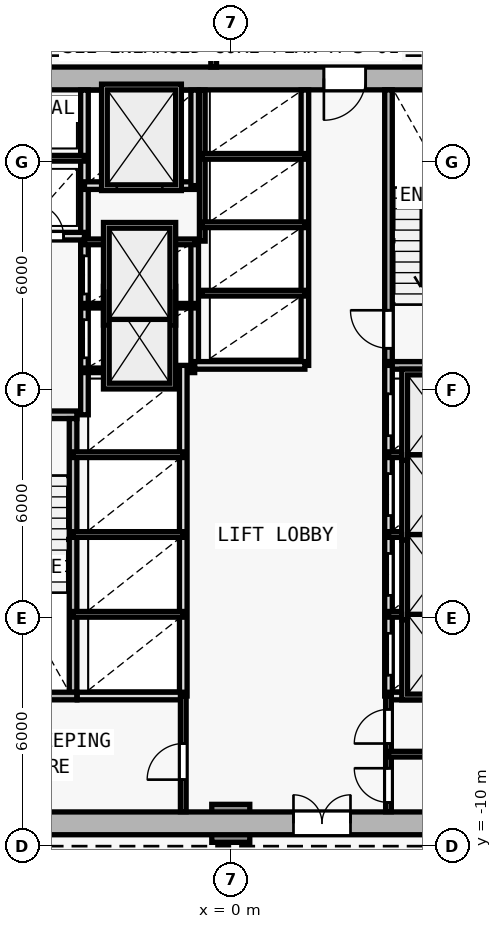
"""IFC4 building model, lengths in metres.
Left out: names, types, materials, properties, quantities, classifications, styles, units other than length and angle.
Written with IfcOpenShell. Run it as: python <this file> out.ifc"""

import sys

from ifc_helpers import new_model, si_unit, direction, frame, frame_2d, origin, origin_2d, place, context, subcontext, project, spatial, rectangle, extrude, element, fill, save


model = new_model("IFC4")
c1 = context("Model", 3, precision=1e-05, world=origin(), true_north=direction((0.0, 1.0)))
c2 = subcontext(c1, "Body", "Model", "MODEL_VIEW")
j1 = project(units=[si_unit("LENGTHUNIT", "METRE"), si_unit("PLANEANGLEUNIT", "RADIAN")], contexts=[c1])
p1 = place(None, origin())
s1 = spatial("IfcSite", under=j1, at=p1, CompositionType="ELEMENT")
p2 = place(p1, origin())
s2 = spatial("IfcBuilding", under=s1, at=p2, CompositionType="ELEMENT")
p3 = place(p2, frame((0.0, 0.0, 13.4)))
s3 = spatial("IfcBuildingStorey", under=s2, at=p3, CompositionType="ELEMENT", Elevation=13.4)
p4 = place(p3, frame((0.0, -9.4, 0.0), z_axis=(0.0, 0.0, 1.0), x_axis=(1.0, 0.0, 0.0)))
e1 = element("IfcColumn", 1, at=p4, inside=s3, PredefinedType="COLUMN", context=c2, shape_type="SweptSolid", body=[
    extrude(rectangle(XDim=1.0, YDim=1.0, at=origin_2d()), origin(), (0.0, 0.0, 1.0), 4.2),
])
p5 = place(p3, frame((-8.0, -9.4, 0.0), z_axis=(0.0, 0.0, 1.0), x_axis=(1.0, 0.0, 0.0)))
e2 = element("IfcWall", 2, at=p5, inside=s3, PredefinedType="SHEAR", context=c2, shape_type="SweptSolid", body=[
    extrude(rectangle(XDim=16.0, YDim=0.6, at=frame_2d((8.0, 0.0))), origin(), (0.0, 0.0, 1.0), 3.92),
])
p6 = place(p5, frame((9.65, 0.0, 0.0)))
e3 = element("IfcOpeningElement", 3, at=p6, cuts=e2, PredefinedType="OPENING", context=c2, shape_type="SweptSolid", body=[
    extrude(rectangle(XDim=1.5, YDim=2.2, at=frame_2d((0.75, 1.1))), frame((0.0, 0.31, 0.0), z_axis=(0.0, -1.0, 0.0), x_axis=(1.0, 0.0, 0.0)), (0.0, 0.0, 1.0), 0.62),
])
p7 = place(p3, frame((8.0, 10.2, 0.0), z_axis=(0.0, 0.0, 1.0), x_axis=(-1.0, 0.0, 0.0)))
e4 = element("IfcWall", 4, at=p7, inside=s3, PredefinedType="SHEAR", context=c2, shape_type="SweptSolid", body=[
    extrude(rectangle(XDim=16.0, YDim=0.6, at=frame_2d((8.0, 0.0))), origin(), (0.0, 0.0, 1.0), 3.92),
])
p8 = place(p7, frame((4.45, 0.0, 0.0)))
e5 = element("IfcOpeningElement", 5, at=p8, cuts=e4, PredefinedType="OPENING", context=c2, shape_type="SweptSolid", body=[
    extrude(rectangle(XDim=1.1, YDim=2.15, at=frame_2d((0.55, 1.075))), frame((0.0, 0.31, 0.0), z_axis=(0.0, -1.0, 0.0), x_axis=(1.0, 0.0, 0.0)), (0.0, 0.0, 1.0), 0.62),
])
p9 = place(p3, frame((-7.4, 1.35, 0.0), z_axis=(0.0, 0.0, 1.0), x_axis=(1.0, 0.0, 0.0)))
e6 = element("IfcWall", 6, at=p9, inside=s3, PredefinedType="SOLIDWALL", context=c2, shape_type="SweptSolid", body=[
    extrude(rectangle(XDim=3.35, YDim=0.2, at=frame_2d((1.675, 0.0))), origin(), (0.0, 0.0, 1.0), 3.92),
])
p10 = place(p9, frame((0.65, 0.0, 0.0)))
e7 = element("IfcOpeningElement", 7, at=p10, cuts=e6, PredefinedType="OPENING", context=c2, shape_type="SweptSolid", body=[
    extrude(rectangle(XDim=1.0, YDim=2.15, at=frame_2d((0.5, 1.075))), frame((0.0, 0.11, 0.0), z_axis=(0.0, -1.0, 0.0), x_axis=(1.0, 0.0, 0.0)), (0.0, 0.0, 1.0), 0.22),
])
p11 = place(p3, frame((-4.15, -5.95, 0.0), z_axis=(0.0, 0.0, 1.0), x_axis=(0.0, 1.0, 0.0)))
e8 = element("IfcWall", 8, at=p11, inside=s3, PredefinedType="SOLIDWALL", context=c2, shape_type="SweptSolid", body=[
    extrude(rectangle(XDim=7.2, YDim=0.2, at=frame_2d((3.6, 0.0))), origin(), (0.0, 0.0, 1.0), 3.92),
])
p12 = place(p3, frame((-3.85, 1.35, 0.0), z_axis=(0.0, 0.0, 1.0), x_axis=(0.0, 1.0, 0.0)))
e9 = element("IfcWall", 9, at=p12, inside=s3, PredefinedType="SOLIDWALL", context=c2, shape_type="SweptSolid", body=[
    extrude(rectangle(XDim=8.545, YDim=0.2, at=frame_2d((4.272, 0.0))), origin(), (0.0, 0.0, 1.0), 3.92),
])
p13 = place(p12, frame((1.5, 0.0, 0.0)))
e10 = element("IfcOpeningElement", 10, at=p13, cuts=e9, PredefinedType="OPENING", context=c2, shape_type="SweptSolid", body=[
    extrude(rectangle(XDim=1.0, YDim=2.15, at=frame_2d((0.5, 1.075))), frame((0.0, 0.11, 0.0), z_axis=(0.0, -1.0, 0.0), x_axis=(1.0, 0.0, 0.0)), (0.0, 0.0, 1.0), 0.22),
])
p14 = place(p12, frame((3.18, 0.0, 0.0)))
e11 = element("IfcOpeningElement", 11, at=p14, cuts=e9, PredefinedType="OPENING", context=c2, shape_type="SweptSolid", body=[
    extrude(rectangle(XDim=1.0, YDim=2.15, at=frame_2d((0.5, 1.075))), frame((0.0, 0.11, 0.0), z_axis=(0.0, -1.0, 0.0), x_axis=(1.0, 0.0, 0.0)), (0.0, 0.0, 1.0), 0.22),
])
p15 = place(p3, frame((-7.395, 6.05, 0.0), z_axis=(0.0, 0.0, 1.0), x_axis=(1.0, 0.0, 0.0)))
e12 = element("IfcWall", 12, at=p15, inside=s3, PredefinedType="SOLIDWALL", context=c2, shape_type="SweptSolid", body=[
    extrude(rectangle(XDim=3.545, YDim=0.2, at=frame_2d((1.772, 0.0))), origin(), (0.0, 0.0, 1.0), 3.92),
])
p16 = place(p15, frame((0.345, 0.0, 0.0)))
e13 = element("IfcOpeningElement", 13, at=p16, cuts=e12, PredefinedType="OPENING", context=c2, shape_type="SweptSolid", body=[
    extrude(rectangle(XDim=0.85, YDim=2.1, at=frame_2d((0.425, 1.05))), frame((0.0, 0.11, 0.0), z_axis=(0.0, -1.0, 0.0), x_axis=(1.0, 0.0, 0.0)), (0.0, 0.0, 1.0), 0.22),
])
p17 = place(p15, frame((2.145, 0.0, 0.0)))
e14 = element("IfcOpeningElement", 14, at=p17, cuts=e12, PredefinedType="OPENING", context=c2, shape_type="SweptSolid", body=[
    extrude(rectangle(XDim=0.85, YDim=2.1, at=frame_2d((0.425, 1.05))), frame((0.0, 0.11, 0.0), z_axis=(0.0, -1.0, 0.0), x_axis=(1.0, 0.0, 0.0)), (0.0, 0.0, 1.0), 0.22),
])
p18 = place(p3, frame((-7.395, 8.1, 0.0), z_axis=(0.0, 0.0, 1.0), x_axis=(1.0, 0.0, 0.0)))
e15 = element("IfcWall", 15, at=p18, inside=s3, PredefinedType="PARTITIONING", context=c2, shape_type="SweptSolid", body=[
    extrude(rectangle(XDim=3.545, YDim=0.15, at=frame_2d((1.772, 0.0))), origin(), (0.0, 0.0, 1.0), 3.92),
])
p19 = place(p3, frame((4.15, 2.75, 0.0), z_axis=(0.0, 0.0, 1.0), x_axis=(0.0, 1.0, 0.0)))
e16 = element("IfcWall", 16, at=p19, inside=s3, PredefinedType="SOLIDWALL", context=c2, shape_type="SweptSolid", body=[
    extrude(rectangle(XDim=7.15, YDim=0.2, at=frame_2d((3.575, 0.0))), origin(), (0.0, 0.0, 1.0), 3.92),
])
p20 = place(p19, frame((0.35, 0.0, 0.0)))
e17 = element("IfcOpeningElement", 17, at=p20, cuts=e16, PredefinedType="OPENING", context=c2, shape_type="SweptSolid", body=[
    extrude(rectangle(XDim=1.0, YDim=2.15, at=frame_2d((0.5, 1.075))), frame((0.0, 0.11, 0.0), z_axis=(0.0, -1.0, 0.0), x_axis=(1.0, 0.0, 0.0)), (0.0, 0.0, 1.0), 0.22),
])
p21 = place(p3, frame((4.05, 2.65, 0.0), z_axis=(0.0, 0.0, 1.0), x_axis=(1.0, 0.0, 0.0)))
e18 = element("IfcWall", 18, at=p21, inside=s3, PredefinedType="SOLIDWALL", context=c2, shape_type="SweptSolid", body=[
    extrude(rectangle(XDim=3.35, YDim=0.2, at=frame_2d((1.675, 0.0))), origin(), (0.0, 0.0, 1.0), 3.92),
])
p22 = place(p3, frame((-0.95, 2.65, 0.0), z_axis=(0.0, 0.0, 1.0), x_axis=(0.0, 1.0, 0.0)))
e19 = element("IfcWall", 19, at=p22, inside=s3, PredefinedType="SOLIDWALL", context=c2, shape_type="SweptSolid", body=[
    extrude(rectangle(XDim=3.27, YDim=0.2, at=frame_2d((1.635, 0.0))), origin(), (0.0, 0.0, 1.0), 3.92),
])
for number, where, z_axis, x_axis in (
    (20, (-3.85, 2.52, 0.0), (0.0, 0.0, 1.0), (1.0, 0.0, 0.0)),
    (21, (-3.85, 4.22, 0.0), (0.0, 0.0, 1.0), (1.0, 0.0, 0.0)),
):
    element("IfcWall", number, at=place(p3, frame(where, z_axis=z_axis, x_axis=x_axis)), inside=s3, PredefinedType="PARTITIONING", context=c2, shape_type="SweptSolid", body=[
        extrude(rectangle(XDim=2.9, YDim=0.12, at=frame_2d((1.45, 0.0))), origin(), (0.0, 0.0, 1.0), 3.92),
    ])
p23 = place(p3, frame((-3.85, 5.9, 0.0), z_axis=(0.0, 0.0, 1.0), x_axis=(1.0, 0.0, 0.0)))
e22 = element("IfcWall", 22, at=p23, inside=s3, PredefinedType="PARTITIONING", context=c2, shape_type="SweptSolid", body=[
    extrude(rectangle(XDim=2.9, YDim=0.15, at=frame_2d((1.45, 0.0))), origin(), (0.0, 0.0, 1.0), 3.92),
])
p24 = place(p3, frame((-3.85, 7.38, 0.0), z_axis=(0.0, 0.0, 1.0), x_axis=(1.0, 0.0, 0.0)))
e23 = element("IfcWall", 23, at=p24, inside=s3, PredefinedType="SOLIDWALL", context=c2, shape_type="SweptSolid", body=[
    extrude(rectangle(XDim=2.9, YDim=0.2, at=frame_2d((1.45, 0.0))), origin(), (0.0, 0.0, 1.0), 3.92),
])
p25 = place(p24, frame((0.85, 0.0, 0.0)))
e24 = element("IfcOpeningElement", 24, at=p25, cuts=e23, PredefinedType="OPENING", context=c2, shape_type="SweptSolid", body=[
    extrude(rectangle(XDim=1.2, YDim=2.2, at=frame_2d((0.6, 1.1))), frame((0.0, 0.11, 0.0), z_axis=(0.0, -1.0, 0.0), x_axis=(1.0, 0.0, 0.0)), (0.0, 0.0, 1.0), 0.22),
])
p26 = place(p3, frame((-0.95, 7.38, 0.0), z_axis=(0.0, 0.0, 1.0), x_axis=(0.0, 1.0, 0.0)))
e25 = element("IfcWall", 25, at=p26, inside=s3, PredefinedType="SOLIDWALL", context=c2, shape_type="SweptSolid", body=[
    extrude(rectangle(XDim=2.515, YDim=0.2, at=frame_2d((1.258, 0.0))), origin(), (0.0, 0.0, 1.0), 3.92),
])
p27 = place(p3, frame((4.15, -6.05, 0.0), z_axis=(0.0, 0.0, 1.0), x_axis=(0.0, 1.0, 0.0)))
e26 = element("IfcWall", 26, at=p27, inside=s3, PredefinedType="SOLIDWALL", context=c2, shape_type="SweptSolid", body=[
    extrude(rectangle(XDim=8.7, YDim=0.2, at=frame_2d((4.35, 0.0))), origin(), (0.0, 0.0, 1.0), 3.92),
])
p28 = place(p27, frame((0.55, 0.0, 0.0)))
e27 = element("IfcOpeningElement", 27, at=p28, cuts=e26, PredefinedType="OPENING", context=c2, shape_type="SweptSolid", body=[
    extrude(rectangle(XDim=1.1, YDim=2.15, at=frame_2d((0.55, 1.075))), frame((0.0, 0.11, 0.0), z_axis=(0.0, -1.0, 0.0), x_axis=(1.0, 0.0, 0.0)), (0.0, 0.0, 1.0), 0.22),
])
p29 = place(p27, frame((2.65, 0.0, 0.0)))
e28 = element("IfcOpeningElement", 28, at=p29, cuts=e26, PredefinedType="OPENING", context=c2, shape_type="SweptSolid", body=[
    extrude(rectangle(XDim=1.1, YDim=2.15, at=frame_2d((0.55, 1.075))), frame((0.0, 0.11, 0.0), z_axis=(0.0, -1.0, 0.0), x_axis=(1.0, 0.0, 0.0)), (0.0, 0.0, 1.0), 0.22),
])
p30 = place(p27, frame((4.75, 0.0, 0.0)))
e29 = element("IfcOpeningElement", 29, at=p30, cuts=e26, PredefinedType="OPENING", context=c2, shape_type="SweptSolid", body=[
    extrude(rectangle(XDim=1.1, YDim=2.15, at=frame_2d((0.55, 1.075))), frame((0.0, 0.11, 0.0), z_axis=(0.0, -1.0, 0.0), x_axis=(1.0, 0.0, 0.0)), (0.0, 0.0, 1.0), 0.22),
])
p31 = place(p27, frame((6.85, 0.0, 0.0)))
e30 = element("IfcOpeningElement", 30, at=p31, cuts=e26, PredefinedType="OPENING", context=c2, shape_type="SweptSolid", body=[
    extrude(rectangle(XDim=1.1, YDim=2.15, at=frame_2d((0.55, 1.075))), frame((0.0, 0.11, 0.0), z_axis=(0.0, -1.0, 0.0), x_axis=(1.0, 0.0, 0.0)), (0.0, 0.0, 1.0), 0.22),
])
for number, where, z_axis, x_axis in (
    (31, (4.15, -3.9, 0.0), (0.0, 0.0, 1.0), (1.0, 0.0, 0.0)),
    (32, (4.15, -1.8, 0.0), (0.0, 0.0, 1.0), (1.0, 0.0, 0.0)),
    (33, (4.15, 0.3, 0.0), (0.0, 0.0, 1.0), (1.0, 0.0, 0.0)),
):
    element("IfcWall", number, at=place(p3, frame(where, z_axis=z_axis, x_axis=x_axis)), inside=s3, PredefinedType="PARTITIONING", context=c2, shape_type="SweptSolid", body=[
        extrude(rectangle(XDim=2.6, YDim=0.15, at=frame_2d((1.3, 0.0))), origin(), (0.0, 0.0, 1.0), 3.92),
    ])
p32 = place(p3, frame((-1.25, -6.05, 0.0), z_axis=(0.0, 0.0, 1.0), x_axis=(0.0, 1.0, 0.0)))
e34 = element("IfcWall", 34, at=p32, inside=s3, PredefinedType="SOLIDWALL", context=c2, shape_type="SweptSolid", body=[
    extrude(rectangle(XDim=8.7, YDim=0.2, at=frame_2d((4.35, 0.0))), origin(), (0.0, 0.0, 1.0), 3.92),
])
for number, where, z_axis, x_axis in (
    (35, (-4.15, -3.9, 0.0), (0.0, 0.0, 1.0), (1.0, 0.0, 0.0)),
    (36, (-4.15, -1.8, 0.0), (0.0, 0.0, 1.0), (1.0, 0.0, 0.0)),
    (37, (-4.15, 0.3, 0.0), (0.0, 0.0, 1.0), (1.0, 0.0, 0.0)),
):
    element("IfcWall", number, at=place(p3, frame(where, z_axis=z_axis, x_axis=x_axis)), inside=s3, PredefinedType="PARTITIONING", context=c2, shape_type="SweptSolid", body=[
        extrude(rectangle(XDim=2.9, YDim=0.15, at=frame_2d((1.45, 0.0))), origin(), (0.0, 0.0, 1.0), 3.92),
    ])
p33 = place(p3, frame((1.95, 2.65, 0.0), z_axis=(0.0, 0.0, 1.0), x_axis=(0.0, 1.0, 0.0)))
e38 = element("IfcWall", 38, at=p33, inside=s3, PredefinedType="SOLIDWALL", context=c2, shape_type="SweptSolid", body=[
    extrude(rectangle(XDim=7.245, YDim=0.2, at=frame_2d((3.623, 0.0))), origin(), (0.0, 0.0, 1.0), 3.92),
])
p34 = place(p3, frame((-0.95, 2.65, 0.0), z_axis=(0.0, 0.0, 1.0), x_axis=(1.0, 0.0, 0.0)))
e39 = element("IfcWall", 39, at=p34, inside=s3, PredefinedType="SOLIDWALL", context=c2, shape_type="SweptSolid", body=[
    extrude(rectangle(XDim=2.9, YDim=0.2, at=frame_2d((1.45, 0.0))), origin(), (0.0, 0.0, 1.0), 3.92),
])
p35 = place(p3, frame((-0.75, 5.92, 0.0), z_axis=(0.0, 0.0, 1.0), x_axis=(0.0, 1.0, 0.0)))
e40 = element("IfcWall", 40, at=p35, inside=s3, PredefinedType="PARTITIONING", context=c2, shape_type="SweptSolid", body=[
    extrude(rectangle(XDim=3.975, YDim=0.15, at=frame_2d((1.988, 0.0))), origin(), (0.0, 0.0, 1.0), 3.92),
])
for number, where, z_axis, x_axis in (
    (41, (-0.75, 4.55, 0.0), (0.0, 0.0, 1.0), (1.0, 0.0, 0.0)),
    (42, (-0.75, 6.35, 0.0), (0.0, 0.0, 1.0), (1.0, 0.0, 0.0)),
    (43, (-0.75, 8.15, 0.0), (0.0, 0.0, 1.0), (1.0, 0.0, 0.0)),
):
    element("IfcWall", number, at=place(p3, frame(where, z_axis=z_axis, x_axis=x_axis)), inside=s3, PredefinedType="PARTITIONING", context=c2, shape_type="SweptSolid", body=[
        extrude(rectangle(XDim=2.7, YDim=0.15, at=frame_2d((1.35, 0.0))), origin(), (0.0, 0.0, 1.0), 3.92),
    ])
p36 = place(p3, frame((-7.4, -6.05, 0.0), z_axis=(0.0, 0.0, 1.0), x_axis=(1.0, 0.0, 0.0)))
e44 = element("IfcWall", 44, at=p36, inside=s3, PredefinedType="SOLIDWALL", context=c2, shape_type="SweptSolid", body=[
    extrude(rectangle(XDim=3.35, YDim=0.2, at=frame_2d((1.675, 0.0))), origin(), (0.0, 0.0, 1.0), 3.92),
])
p37 = place(p3, frame((-4.04, -6.05, 0.0), z_axis=(0.0, 0.0, 1.0), x_axis=(1.0, 0.0, 0.0)))
e45 = element("IfcWall", 45, at=p37, inside=s3, PredefinedType="SOLIDWALL", context=c2, shape_type="SweptSolid", body=[
    extrude(rectangle(XDim=2.79, YDim=0.2, at=frame_2d((1.395, 0.0))), origin(), (0.0, 0.0, 1.0), 3.92),
])
p38 = place(p3, frame((4.15, -6.05, 0.0), z_axis=(0.0, 0.0, 1.0), x_axis=(1.0, 0.0, 0.0)))
e46 = element("IfcWall", 46, at=p38, inside=s3, PredefinedType="SOLIDWALL", context=c2, shape_type="SweptSolid", body=[
    extrude(rectangle(XDim=3.245, YDim=0.2, at=frame_2d((1.623, 0.0))), origin(), (0.0, 0.0, 1.0), 3.92),
])
p39 = place(p3, frame((-1.25, -9.095, 0.0), z_axis=(0.0, 0.0, 1.0), x_axis=(0.0, 1.0, 0.0)))
e47 = element("IfcWall", 47, at=p39, inside=s3, PredefinedType="PARTITIONING", context=c2, shape_type="SweptSolid", body=[
    extrude(rectangle(XDim=3.045, YDim=0.15, at=frame_2d((1.522, 0.0))), origin(), (0.0, 0.0, 1.0), 3.92),
])
p40 = place(p39, frame((0.845, 0.0, 0.0)))
e48 = element("IfcOpeningElement", 48, at=p40, cuts=e47, PredefinedType="OPENING", context=c2, shape_type="SweptSolid", body=[
    extrude(rectangle(XDim=0.95, YDim=2.1, at=frame_2d((0.475, 1.05))), frame((0.0, 0.085, 0.0), z_axis=(0.0, -1.0, 0.0), x_axis=(1.0, 0.0, 0.0)), (0.0, 0.0, 1.0), 0.17),
])
p41 = place(p3, frame((4.15, -9.095, 0.0), z_axis=(0.0, 0.0, 1.0), x_axis=(0.0, 1.0, 0.0)))
e49 = element("IfcWall", 49, at=p41, inside=s3, PredefinedType="PARTITIONING", context=c2, shape_type="SweptSolid", body=[
    extrude(rectangle(XDim=3.045, YDim=0.15, at=frame_2d((1.522, 0.0))), origin(), (0.0, 0.0, 1.0), 3.92),
])
p42 = place(p41, frame((0.245, 0.0, 0.0)))
e50 = element("IfcOpeningElement", 50, at=p42, cuts=e49, PredefinedType="OPENING", context=c2, shape_type="SweptSolid", body=[
    extrude(rectangle(XDim=0.9, YDim=2.1, at=frame_2d((0.45, 1.05))), frame((0.0, 0.085, 0.0), z_axis=(0.0, -1.0, 0.0), x_axis=(1.0, 0.0, 0.0)), (0.0, 0.0, 1.0), 0.17),
])
p43 = place(p41, frame((1.795, 0.0, 0.0)))
e51 = element("IfcOpeningElement", 51, at=p43, cuts=e49, PredefinedType="OPENING", context=c2, shape_type="SweptSolid", body=[
    extrude(rectangle(XDim=0.9, YDim=2.1, at=frame_2d((0.45, 1.05))), frame((0.0, 0.085, 0.0), z_axis=(0.0, -1.0, 0.0), x_axis=(1.0, 0.0, 0.0)), (0.0, 0.0, 1.0), 0.17),
])
p44 = place(p3, frame((4.15, -7.58, 0.0), z_axis=(0.0, 0.0, 1.0), x_axis=(1.0, 0.0, 0.0)))
e52 = element("IfcWall", 52, at=p44, inside=s3, PredefinedType="PARTITIONING", context=c2, shape_type="SweptSolid", body=[
    extrude(rectangle(XDim=3.245, YDim=0.15, at=frame_2d((1.623, 0.0))), origin(), (0.0, 0.0, 1.0), 3.92),
])
p45 = place(p3, frame((-0.45, 10.5, 0.0), z_axis=(0.0, 0.0, 1.0), x_axis=(0.0, 1.0, 0.0)))
e53 = element("IfcWall", 53, at=p45, inside=s3, PredefinedType="PARTITIONING", context=c2, shape_type="SweptSolid", body=[
    extrude(rectangle(XDim=4.75, YDim=0.15, at=frame_2d((2.375, 0.0))), origin(), (0.0, 0.0, 1.0), 3.92),
])
p46 = place(p6, origin())
e54 = element("IfcDoor", 54, at=p46, inside=s3, OperationType="DOUBLE_DOOR_SINGLE_SWING", PredefinedType="DOOR", context=c2, shape_type="SweptSolid", body=[
    extrude(rectangle(XDim=1.5, YDim=2.2, at=frame_2d((0.75, 1.1))), frame((0.0, 0.025, 0.0), z_axis=(0.0, -1.0, 0.0), x_axis=(1.0, 0.0, 0.0)), (0.0, 0.0, 1.0), 0.05),
])
fill(e3, e54)
p47 = place(p8, origin())
e55 = element("IfcDoor", 55, at=p47, inside=s3, OperationType="SINGLE_SWING_RIGHT", PredefinedType="DOOR", context=c2, shape_type="SweptSolid", body=[
    extrude(rectangle(XDim=1.1, YDim=2.15, at=frame_2d((0.55, 1.075))), frame((0.0, 0.025, 0.0), z_axis=(0.0, -1.0, 0.0), x_axis=(1.0, 0.0, 0.0)), (0.0, 0.0, 1.0), 0.05),
])
fill(e5, e55)
p48 = place(p17, origin())
e56 = element("IfcDoor", 56, at=p48, inside=s3, OperationType="SINGLE_SWING_LEFT", PredefinedType="DOOR", context=c2, shape_type="SweptSolid", body=[
    extrude(rectangle(XDim=0.85, YDim=2.1, at=frame_2d((0.425, 1.05))), frame((0.0, 0.025, 0.0), z_axis=(0.0, -1.0, 0.0), x_axis=(1.0, 0.0, 0.0)), (0.0, 0.0, 1.0), 0.05),
])
fill(e14, e56)
p49 = place(p20, origin())
e57 = element("IfcDoor", 57, at=p49, inside=s3, OperationType="SINGLE_SWING_RIGHT", PredefinedType="DOOR", context=c2, shape_type="SweptSolid", body=[
    extrude(rectangle(XDim=1.0, YDim=2.15, at=frame_2d((0.5, 1.075))), frame((0.0, 0.025, 0.0), z_axis=(0.0, -1.0, 0.0), x_axis=(1.0, 0.0, 0.0)), (0.0, 0.0, 1.0), 0.05),
])
fill(e17, e57)
p50 = place(p25, origin())
e58 = element("IfcDoor", 58, at=p50, inside=s3, OperationType="DOUBLE_DOOR_SLIDING", PredefinedType="DOOR", context=c2, shape_type="SweptSolid", body=[
    extrude(rectangle(XDim=1.2, YDim=2.2, at=frame_2d((0.6, 1.1))), frame((0.0, 0.025, 0.0), z_axis=(0.0, -1.0, 0.0), x_axis=(1.0, 0.0, 0.0)), (0.0, 0.0, 1.0), 0.05),
])
fill(e24, e58)
p51 = place(p28, origin())
e59 = element("IfcDoor", 59, at=p51, inside=s3, OperationType="DOUBLE_DOOR_SLIDING", PredefinedType="DOOR", context=c2, shape_type="SweptSolid", body=[
    extrude(rectangle(XDim=1.1, YDim=2.15, at=frame_2d((0.55, 1.075))), frame((0.0, 0.025, 0.0), z_axis=(0.0, -1.0, 0.0), x_axis=(1.0, 0.0, 0.0)), (0.0, 0.0, 1.0), 0.05),
])
fill(e27, e59)
p52 = place(p29, origin())
e60 = element("IfcDoor", 60, at=p52, inside=s3, OperationType="DOUBLE_DOOR_SLIDING", PredefinedType="DOOR", context=c2, shape_type="SweptSolid", body=[
    extrude(rectangle(XDim=1.1, YDim=2.15, at=frame_2d((0.55, 1.075))), frame((0.0, 0.025, 0.0), z_axis=(0.0, -1.0, 0.0), x_axis=(1.0, 0.0, 0.0)), (0.0, 0.0, 1.0), 0.05),
])
fill(e28, e60)
p53 = place(p30, origin())
e61 = element("IfcDoor", 61, at=p53, inside=s3, OperationType="DOUBLE_DOOR_SLIDING", PredefinedType="DOOR", context=c2, shape_type="SweptSolid", body=[
    extrude(rectangle(XDim=1.1, YDim=2.15, at=frame_2d((0.55, 1.075))), frame((0.0, 0.025, 0.0), z_axis=(0.0, -1.0, 0.0), x_axis=(1.0, 0.0, 0.0)), (0.0, 0.0, 1.0), 0.05),
])
fill(e29, e61)
p54 = place(p31, origin())
e62 = element("IfcDoor", 62, at=p54, inside=s3, OperationType="DOUBLE_DOOR_SLIDING", PredefinedType="DOOR", context=c2, shape_type="SweptSolid", body=[
    extrude(rectangle(XDim=1.1, YDim=2.15, at=frame_2d((0.55, 1.075))), frame((0.0, 0.025, 0.0), z_axis=(0.0, -1.0, 0.0), x_axis=(1.0, 0.0, 0.0)), (0.0, 0.0, 1.0), 0.05),
])
fill(e30, e62)
p55 = place(p13, origin())
e63 = element("IfcDoor", 63, at=p55, inside=s3, OperationType="DOUBLE_DOOR_SLIDING", PredefinedType="DOOR", context=c2, shape_type="SweptSolid", body=[
    extrude(rectangle(XDim=1.0, YDim=2.15, at=frame_2d((0.5, 1.075))), frame((0.0, 0.025, 0.0), z_axis=(0.0, -1.0, 0.0), x_axis=(1.0, 0.0, 0.0)), (0.0, 0.0, 1.0), 0.05),
])
fill(e10, e63)
p56 = place(p14, origin())
e64 = element("IfcDoor", 64, at=p56, inside=s3, OperationType="DOUBLE_DOOR_SLIDING", PredefinedType="DOOR", context=c2, shape_type="SweptSolid", body=[
    extrude(rectangle(XDim=1.0, YDim=2.15, at=frame_2d((0.5, 1.075))), frame((0.0, 0.025, 0.0), z_axis=(0.0, -1.0, 0.0), x_axis=(1.0, 0.0, 0.0)), (0.0, 0.0, 1.0), 0.05),
])
fill(e11, e64)
p57 = place(p40, origin())
e65 = element("IfcDoor", 65, at=p57, inside=s3, OperationType="SINGLE_SWING_LEFT", PredefinedType="DOOR", context=c2, shape_type="SweptSolid", body=[
    extrude(rectangle(XDim=0.95, YDim=2.1, at=frame_2d((0.475, 1.05))), frame((0.0, 0.025, 0.0), z_axis=(0.0, -1.0, 0.0), x_axis=(1.0, 0.0, 0.0)), (0.0, 0.0, 1.0), 0.05),
])
fill(e48, e65)
p58 = place(p42, origin())
e66 = element("IfcDoor", 66, at=p58, inside=s3, OperationType="SINGLE_SWING_RIGHT", PredefinedType="DOOR", context=c2, shape_type="SweptSolid", body=[
    extrude(rectangle(XDim=0.9, YDim=2.1, at=frame_2d((0.45, 1.05))), frame((0.0, 0.025, 0.0), z_axis=(0.0, -1.0, 0.0), x_axis=(1.0, 0.0, 0.0)), (0.0, 0.0, 1.0), 0.05),
])
fill(e50, e66)
p59 = place(p43, origin())
e67 = element("IfcDoor", 67, at=p59, inside=s3, OperationType="SINGLE_SWING_LEFT", PredefinedType="DOOR", context=c2, shape_type="SweptSolid", body=[
    extrude(rectangle(XDim=0.9, YDim=2.1, at=frame_2d((0.45, 1.05))), frame((0.0, 0.025, 0.0), z_axis=(0.0, -1.0, 0.0), x_axis=(1.0, 0.0, 0.0)), (0.0, 0.0, 1.0), 0.05),
])
fill(e51, e67)
save(model, sys.argv[1])
